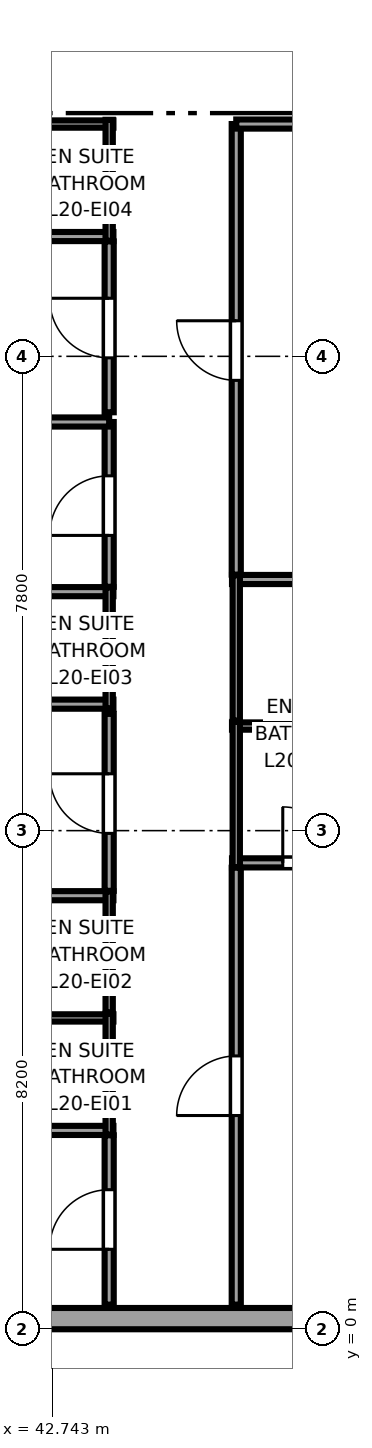
"""IFC4 building model, lengths in metres.
Left out: names, types, materials, properties, quantities, classifications, styles, units other than length and angle.
Written with IfcOpenShell. Run it as: python <this file> out.ifc"""

import sys

from ifc_helpers import new_model, si_unit, direction, frame, frame_2d, origin, place, context, subcontext, project, spatial, rectangle, extrude, source, transform, mapped, element, fill, save


model = new_model("IFC4")
c1 = context("Model", 3, precision=1e-05, world=origin(), true_north=direction((0.0, 1.0)))
c2 = subcontext(c1, "Body", "Model", "MODEL_VIEW")
j1 = project(units=[si_unit("LENGTHUNIT", "METRE"), si_unit("PLANEANGLEUNIT", "RADIAN")], contexts=[c1])
p1 = place(None, origin())
s1 = spatial("IfcSite", under=j1, at=p1, CompositionType="ELEMENT")
p2 = place(p1, origin())
s2 = spatial("IfcBuilding", under=s1, at=p2, CompositionType="ELEMENT")
p3 = place(p2, frame((0.0, 0.0, 81.7)))
s3 = spatial("IfcBuildingStorey", under=s2, at=p3, CompositionType="ELEMENT", Elevation=81.7)
p4 = place(p3, frame((34.375, 0.175, 0.0), z_axis=(0.0, 0.0, 1.0), x_axis=(1.0, 0.0, 0.0)))
e1 = element("IfcWall", 1, at=p4, inside=s3, PredefinedType="SOLIDWALL", context=c2, shape_type="SweptSolid", body=[
    extrude(rectangle(XDim=18.008, YDim=0.35, at=frame_2d((9.004, 0.0))), origin(), (0.0, 0.0, 1.0), 3.37),
])
p5 = place(p4, frame((1.801, 0.0, 0.68)))
e2 = element("IfcOpeningElement", 2, at=p5, cuts=e1, PredefinedType="OPENING", context=c2, shape_type="SweptSolid", body=[
    extrude(rectangle(XDim=1.8, YDim=1.85, at=frame_2d((0.9, 0.925))), frame((0.0, 0.185, 0.0), z_axis=(0.0, -1.0, 0.0), x_axis=(1.0, 0.0, 0.0)), (0.0, 0.0, 1.0), 0.37),
])
p6 = place(p4, frame((4.953, 0.0, 0.68)))
e3 = element("IfcOpeningElement", 3, at=p6, cuts=e1, PredefinedType="OPENING", context=c2, shape_type="SweptSolid", body=[
    extrude(rectangle(XDim=1.8, YDim=1.85, at=frame_2d((0.9, 0.925))), frame((0.0, 0.185, 0.0), z_axis=(0.0, -1.0, 0.0), x_axis=(1.0, 0.0, 0.0)), (0.0, 0.0, 1.0), 0.37),
])
p7 = place(p3, frame((41.16, 3.27, 0.0), z_axis=(0.0, 0.0, 1.0), x_axis=(1.0, 0.0, 0.0)))
e4 = element("IfcWall", 4, at=p7, inside=s3, PredefinedType="PARTITIONING", context=c2, shape_type="SweptSolid", body=[
    extrude(rectangle(XDim=2.59, YDim=0.15, at=frame_2d((1.295, 0.0))), origin(), (0.0, 0.0, 1.0), 3.37),
])
p8 = place(p3, frame((41.16, 5.12, 0.0), z_axis=(0.0, 0.0, 1.0), x_axis=(1.0, 0.0, 0.0)))
e5 = element("IfcWall", 5, at=p8, inside=s3, PredefinedType="PLUMBINGWALL", context=c2, shape_type="SweptSolid", body=[
    extrude(rectangle(XDim=2.59, YDim=0.12, at=frame_2d((1.295, 0.0))), origin(), (0.0, 0.0, 1.0), 3.37),
])
p9 = place(p3, frame((43.68, 3.2, 0.0), z_axis=(0.0, 0.0, 1.0), x_axis=(0.0, 1.0, 0.0)))
e6 = element("IfcWall", 6, at=p9, inside=s3, PredefinedType="PLUMBINGWALL", context=c2, shape_type="SweptSolid", body=[
    extrude(rectangle(XDim=1.99, YDim=0.12, at=frame_2d((0.995, 0.0))), origin(), (0.0, 0.0, 1.0), 3.37),
])
p10 = place(p3, frame((41.16, 7.13, 0.0), z_axis=(0.0, 0.0, 1.0), x_axis=(1.0, 0.0, 0.0)))
e7 = element("IfcWall", 7, at=p10, inside=s3, PredefinedType="PARTITIONING", context=c2, shape_type="SweptSolid", body=[
    extrude(rectangle(XDim=2.59, YDim=0.15, at=frame_2d((1.295, 0.0))), origin(), (0.0, 0.0, 1.0), 3.37),
])
p11 = place(p3, frame((43.68, 5.21, 0.0), z_axis=(0.0, 0.0, 1.0), x_axis=(0.0, 1.0, 0.0)))
e8 = element("IfcWall", 8, at=p11, inside=s3, PredefinedType="PLUMBINGWALL", context=c2, shape_type="SweptSolid", body=[
    extrude(rectangle(XDim=1.99, YDim=0.12, at=frame_2d((0.995, 0.0))), origin(), (0.0, 0.0, 1.0), 3.37),
])
p12 = place(p3, frame((34.65, 10.28, 0.0), z_axis=(0.0, 0.0, 1.0), x_axis=(1.0, 0.0, 0.0)))
e9 = element("IfcWall", 9, at=p12, inside=s3, PredefinedType="PARTITIONING", context=c2, shape_type="SweptSolid", body=[
    extrude(rectangle(XDim=9.1, YDim=0.15, at=frame_2d((4.55, 0.0))), origin(), (0.0, 0.0, 1.0), 3.37),
])
p13 = place(p3, frame((41.16, 12.13, 0.0), z_axis=(0.0, 0.0, 1.0), x_axis=(1.0, 0.0, 0.0)))
e10 = element("IfcWall", 10, at=p13, inside=s3, PredefinedType="PARTITIONING", context=c2, shape_type="SweptSolid", body=[
    extrude(rectangle(XDim=2.59, YDim=0.15, at=frame_2d((1.295, 0.0))), origin(), (0.0, 0.0, 1.0), 3.37),
])
p14 = place(p3, frame((43.68, 10.21, 0.0), z_axis=(0.0, 0.0, 1.0), x_axis=(0.0, 1.0, 0.0)))
e11 = element("IfcWall", 11, at=p14, inside=s3, PredefinedType="PLUMBINGWALL", context=c2, shape_type="SweptSolid", body=[
    extrude(rectangle(XDim=1.99, YDim=0.12, at=frame_2d((0.995, 0.0))), origin(), (0.0, 0.0, 1.0), 3.37),
])
p15 = place(p3, frame((41.16, 17.97, 0.0), z_axis=(0.0, 0.0, 1.0), x_axis=(1.0, 0.0, 0.0)))
e12 = element("IfcWall", 12, at=p15, inside=s3, PredefinedType="PARTITIONING", context=c2, shape_type="SweptSolid", body=[
    extrude(rectangle(XDim=2.59, YDim=0.15, at=frame_2d((1.295, 0.0))), origin(), (0.0, 0.0, 1.0), 3.37),
])
p16 = place(p3, frame((41.16, 19.82, 0.0), z_axis=(0.0, 0.0, 1.0), x_axis=(1.0, 0.0, 0.0)))
e13 = element("IfcWall", 13, at=p16, inside=s3, PredefinedType="PLUMBINGWALL", context=c2, shape_type="SweptSolid", body=[
    extrude(rectangle(XDim=2.59, YDim=0.12, at=frame_2d((1.295, 0.0))), origin(), (0.0, 0.0, 1.0), 3.37),
])
p17 = place(p3, frame((43.68, 17.9, 0.0), z_axis=(0.0, 0.0, 1.0), x_axis=(0.0, 1.0, 0.0)))
e14 = element("IfcWall", 14, at=p17, inside=s3, PredefinedType="PLUMBINGWALL", context=c2, shape_type="SweptSolid", body=[
    extrude(rectangle(XDim=1.99, YDim=0.12, at=frame_2d((0.995, 0.0))), origin(), (0.0, 0.0, 1.0), 3.37),
])
p18 = place(p3, frame((45.7, 7.67, 0.0), z_axis=(0.0, 0.0, 1.0), x_axis=(1.0, 0.0, 0.0)))
e15 = element("IfcWall", 15, at=p18, inside=s3, PredefinedType="PARTITIONING", context=c2, shape_type="SweptSolid", body=[
    extrude(rectangle(XDim=2.59, YDim=0.15, at=frame_2d((1.295, 0.0))), origin(), (0.0, 0.0, 1.0), 3.37),
])
p19 = place(p18, frame((0.835, 0.0, 0.0)))
e16 = element("IfcOpeningElement", 16, at=p19, cuts=e15, PredefinedType="OPENING", context=c2, shape_type="SweptSolid", body=[
    extrude(rectangle(XDim=0.92, YDim=2.01, at=frame_2d((0.46, 1.005))), frame((0.0, 0.085, 0.0), z_axis=(0.0, -1.0, 0.0), x_axis=(1.0, 0.0, 0.0)), (0.0, 0.0, 1.0), 0.17),
])
p20 = place(p3, frame((45.7, 9.92, 0.0), z_axis=(0.0, 0.0, 1.0), x_axis=(1.0, 0.0, 0.0)))
e17 = element("IfcWall", 17, at=p20, inside=s3, PredefinedType="PLUMBINGWALL", context=c2, shape_type="SweptSolid", body=[
    extrude(rectangle(XDim=2.59, YDim=0.12, at=frame_2d((1.295, 0.0))), origin(), (0.0, 0.0, 1.0), 3.37),
])
p21 = place(p3, frame((45.77, 7.6, 0.0), z_axis=(0.0, 0.0, 1.0), x_axis=(0.0, 1.0, 0.0)))
e18 = element("IfcWall", 18, at=p21, inside=s3, PredefinedType="PLUMBINGWALL", context=c2, shape_type="SweptSolid", body=[
    extrude(rectangle(XDim=2.39, YDim=0.12, at=frame_2d((1.195, 0.0))), origin(), (0.0, 0.0, 1.0), 3.37),
])
p22 = place(p3, frame((45.7, 12.33, 0.0), z_axis=(0.0, 0.0, 1.0), x_axis=(1.0, 0.0, 0.0)))
e19 = element("IfcWall", 19, at=p22, inside=s3, PredefinedType="PARTITIONING", context=c2, shape_type="SweptSolid", body=[
    extrude(rectangle(XDim=2.59, YDim=0.15, at=frame_2d((1.295, 0.0))), origin(), (0.0, 0.0, 1.0), 3.37),
])
p23 = place(p3, frame((45.77, 10.01, 0.0), z_axis=(0.0, 0.0, 1.0), x_axis=(0.0, 1.0, 0.0)))
e20 = element("IfcWall", 20, at=p23, inside=s3, PredefinedType="PLUMBINGWALL", context=c2, shape_type="SweptSolid", body=[
    extrude(rectangle(XDim=2.39, YDim=0.12, at=frame_2d((1.195, 0.0))), origin(), (0.0, 0.0, 1.0), 3.37),
])
p24 = place(p3, frame((43.68, 0.405, 0.0), z_axis=(0.0, 0.0, 1.0), x_axis=(0.0, 1.0, 0.0)))
e21 = element("IfcWall", 21, at=p24, inside=s3, PredefinedType="PARTITIONING", context=c2, shape_type="SweptSolid", body=[
    extrude(rectangle(XDim=2.785, YDim=0.15, at=frame_2d((1.393, 0.0))), origin(), (0.0, 0.0, 1.0), 3.37),
])
p25 = place(p24, frame((0.91, 0.0, 0.0)))
e22 = element("IfcOpeningElement", 22, at=p25, cuts=e21, PredefinedType="OPENING", context=c2, shape_type="SweptSolid", body=[
    extrude(rectangle(XDim=0.98, YDim=2.12, at=frame_2d((0.49, 1.06))), frame((0.0, 0.085, 0.0), z_axis=(0.0, -1.0, 0.0), x_axis=(1.0, 0.0, 0.0)), (0.0, 0.0, 1.0), 0.17),
])
p26 = place(p3, frame((43.68, 7.21, 0.0), z_axis=(0.0, 0.0, 1.0), x_axis=(0.0, 1.0, 0.0)))
e23 = element("IfcWall", 23, at=p26, inside=s3, PredefinedType="PARTITIONING", context=c2, shape_type="SweptSolid", body=[
    extrude(rectangle(XDim=2.91, YDim=0.15, at=frame_2d((1.455, 0.0))), origin(), (0.0, 0.0, 1.0), 3.37),
])
p27 = place(p26, frame((0.945, 0.0, 0.0)))
e24 = element("IfcOpeningElement", 24, at=p27, cuts=e23, PredefinedType="OPENING", context=c2, shape_type="SweptSolid", body=[
    extrude(rectangle(XDim=0.98, YDim=2.12, at=frame_2d((0.49, 1.06))), frame((0.0, 0.085, 0.0), z_axis=(0.0, -1.0, 0.0), x_axis=(1.0, 0.0, 0.0)), (0.0, 0.0, 1.0), 0.17),
])
p28 = place(p3, frame((43.68, 12.21, 0.0), z_axis=(0.0, 0.0, 1.0), x_axis=(0.0, 1.0, 0.0)))
e25 = element("IfcWall", 25, at=p28, inside=s3, PredefinedType="PARTITIONING", context=c2, shape_type="SweptSolid", body=[
    extrude(rectangle(XDim=2.71, YDim=0.15, at=frame_2d((1.355, 0.0))), origin(), (0.0, 0.0, 1.0), 3.37),
])
p29 = place(p28, frame((0.845, 0.0, 0.0)))
e26 = element("IfcOpeningElement", 26, at=p29, cuts=e25, PredefinedType="OPENING", context=c2, shape_type="SweptSolid", body=[
    extrude(rectangle(XDim=0.98, YDim=2.12, at=frame_2d((0.49, 1.06))), frame((0.0, 0.085, 0.0), z_axis=(0.0, -1.0, 0.0), x_axis=(1.0, 0.0, 0.0)), (0.0, 0.0, 1.0), 0.17),
])
p30 = place(p3, frame((34.65, 14.92, 0.0), z_axis=(0.0, 0.0, 1.0), x_axis=(1.0, 0.0, 0.0)))
e27 = element("IfcWall", 27, at=p30, inside=s3, PredefinedType="PARTITIONING", context=c2, shape_type="SweptSolid", body=[
    extrude(rectangle(XDim=9.03, YDim=0.15, at=frame_2d((4.515, 0.0))), origin(), (0.0, 0.0, 1.0), 3.37),
])
p31 = place(p3, frame((43.68, 15.08, 0.0), z_axis=(0.0, 0.0, 1.0), x_axis=(0.0, 1.0, 0.0)))
e28 = element("IfcWall", 28, at=p31, inside=s3, PredefinedType="PARTITIONING", context=c2, shape_type="SweptSolid", body=[
    extrude(rectangle(XDim=2.81, YDim=0.15, at=frame_2d((1.405, 0.0))), origin(), (0.0, 0.0, 1.0), 3.37),
])
p32 = place(p31, frame((0.895, 0.0, 0.0)))
e29 = element("IfcOpeningElement", 29, at=p32, cuts=e28, PredefinedType="OPENING", context=c2, shape_type="SweptSolid", body=[
    extrude(rectangle(XDim=0.98, YDim=2.12, at=frame_2d((0.49, 1.06))), frame((0.0, 0.085, 0.0), z_axis=(0.0, -1.0, 0.0), x_axis=(1.0, 0.0, 0.0)), (0.0, 0.0, 1.0), 0.17),
])
p33 = place(p3, frame((45.77, 0.405, 0.0), z_axis=(0.0, 0.0, 1.0), x_axis=(0.0, 1.0, 0.0)))
e30 = element("IfcWall", 30, at=p33, inside=s3, PredefinedType="PARTITIONING", context=c2, shape_type="SweptSolid", body=[
    extrude(rectangle(XDim=7.185, YDim=0.15, at=frame_2d((3.593, 0.0))), origin(), (0.0, 0.0, 1.0), 3.37),
])
p34 = place(p33, frame((3.11, 0.0, 0.0)))
e31 = element("IfcOpeningElement", 31, at=p34, cuts=e30, PredefinedType="OPENING", context=c2, shape_type="SweptSolid", body=[
    extrude(rectangle(XDim=0.98, YDim=2.12, at=frame_2d((0.49, 1.06))), frame((0.0, 0.085, 0.0), z_axis=(0.0, -1.0, 0.0), x_axis=(1.0, 0.0, 0.0)), (0.0, 0.0, 1.0), 0.17),
])
p35 = place(p3, frame((45.77, 12.41, 0.0), z_axis=(0.0, 0.0, 1.0), x_axis=(0.0, 1.0, 0.0)))
e32 = element("IfcWall", 32, at=p35, inside=s3, PredefinedType="PARTITIONING", context=c2, shape_type="SweptSolid", body=[
    extrude(rectangle(XDim=7.41, YDim=0.15, at=frame_2d((3.705, 0.0))), origin(), (0.0, 0.0, 1.0), 3.37),
])
p36 = place(p35, frame((3.195, 0.0, 0.0)))
e33 = element("IfcOpeningElement", 33, at=p36, cuts=e32, PredefinedType="OPENING", context=c2, shape_type="SweptSolid", body=[
    extrude(rectangle(XDim=0.98, YDim=2.12, at=frame_2d((0.49, 1.06))), frame((0.0, 0.085, 0.0), z_axis=(0.0, -1.0, 0.0), x_axis=(1.0, 0.0, 0.0)), (0.0, 0.0, 1.0), 0.17),
])
p37 = place(p3, frame((45.77, 19.82, 0.0), z_axis=(0.0, 0.0, 1.0), x_axis=(1.0, 0.0, 0.0)))
e34 = element("IfcWall", 34, at=p37, inside=s3, PredefinedType="PARTITIONING", context=c2, shape_type="SweptSolid", body=[
    extrude(rectangle(XDim=10.825, YDim=0.15, at=frame_2d((5.413, 0.0))), origin(), (0.0, 0.0, 1.0), 3.37),
])
m1 = source(origin(), c2, "Body", "SweptSolid", [
    extrude(rectangle(XDim=0.92, YDim=2.01, at=frame_2d((0.46, 1.005))), frame((0.0, 0.025, 0.0), z_axis=(0.0, -1.0, 0.0), x_axis=(1.0, 0.0, 0.0)), (0.0, 0.0, 1.0), 0.05),
])
p38 = place(p19, origin())
e35 = element("IfcDoor", 35, at=p38, inside=s3, OperationType="SINGLE_SWING_LEFT", PredefinedType="DOOR", context=c2, shape_type="MappedRepresentation", body=[
    mapped(m1, transform((0.0, 0.0, 0.0), x_axis=(1.0, 0.0, 0.0), y_axis=(0.0, 1.0, 0.0), z_axis=(0.0, 0.0, 1.0), scale=1.0)),
])
fill(e16, e35)
m2 = source(origin(), c2, "Body", "SweptSolid", [
    extrude(rectangle(XDim=0.98, YDim=2.12, at=frame_2d((0.49, 1.06))), frame((0.0, 0.025, 0.0), z_axis=(0.0, -1.0, 0.0), x_axis=(1.0, 0.0, 0.0)), (0.0, 0.0, 1.0), 0.05),
])
p39 = place(p25, origin())
e36 = element("IfcDoor", 36, at=p39, inside=s3, OperationType="SINGLE_SWING_LEFT", PredefinedType="DOOR", context=c2, shape_type="MappedRepresentation", body=[
    mapped(m2, transform((0.0, 0.0, 0.0), x_axis=(1.0, 0.0, 0.0), y_axis=(0.0, 1.0, 0.0), z_axis=(0.0, 0.0, 1.0), scale=1.0)),
])
fill(e22, e36)
p40 = place(p27, origin())
e37 = element("IfcDoor", 37, at=p40, inside=s3, OperationType="SINGLE_SWING_RIGHT", PredefinedType="DOOR", context=c2, shape_type="MappedRepresentation", body=[
    mapped(m2, transform((0.0, 0.0, 0.0), x_axis=(1.0, 0.0, 0.0), y_axis=(0.0, 1.0, 0.0), z_axis=(0.0, 0.0, 1.0), scale=1.0)),
])
fill(e24, e37)
p41 = place(p29, origin())
e38 = element("IfcDoor", 38, at=p41, inside=s3, OperationType="SINGLE_SWING_LEFT", PredefinedType="DOOR", context=c2, shape_type="MappedRepresentation", body=[
    mapped(m2, transform((0.0, 0.0, 0.0), x_axis=(1.0, 0.0, 0.0), y_axis=(0.0, 1.0, 0.0), z_axis=(0.0, 0.0, 1.0), scale=1.0)),
])
fill(e26, e38)
p42 = place(p32, origin())
e39 = element("IfcDoor", 39, at=p42, inside=s3, OperationType="SINGLE_SWING_RIGHT", PredefinedType="DOOR", context=c2, shape_type="MappedRepresentation", body=[
    mapped(m2, transform((0.0, 0.0, 0.0), x_axis=(1.0, 0.0, 0.0), y_axis=(0.0, 1.0, 0.0), z_axis=(0.0, 0.0, 1.0), scale=1.0)),
])
fill(e29, e39)
p43 = place(p34, origin())
e40 = element("IfcDoor", 40, at=p43, inside=s3, OperationType="SINGLE_SWING_LEFT", PredefinedType="DOOR", context=c2, shape_type="MappedRepresentation", body=[
    mapped(m2, transform((0.0, 0.0, 0.0), x_axis=(1.0, 0.0, 0.0), y_axis=(0.0, 1.0, 0.0), z_axis=(0.0, 0.0, 1.0), scale=1.0)),
])
fill(e31, e40)
p44 = place(p36, origin())
e41 = element("IfcDoor", 41, at=p44, inside=s3, OperationType="SINGLE_SWING_RIGHT", PredefinedType="DOOR", context=c2, shape_type="MappedRepresentation", body=[
    mapped(m2, transform((0.0, 0.0, 0.0), x_axis=(1.0, 0.0, 0.0), y_axis=(0.0, 1.0, 0.0), z_axis=(0.0, 0.0, 1.0), scale=1.0)),
])
fill(e33, e41)
save(model, sys.argv[1])
